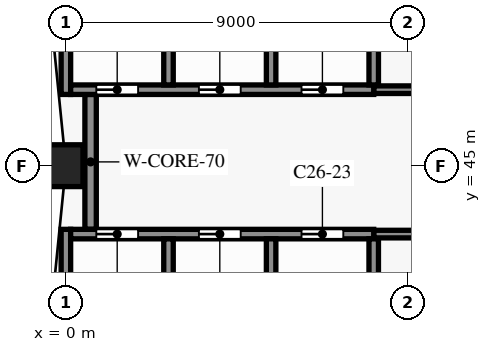
"""IFC4 building model, lengths in metres.
Left out: names, types, materials, properties, quantities, classifications, styles, units other than length and angle.
Written with IfcOpenShell. Run it as: python <this file> out.ifc"""

import sys

from ifc_helpers import new_model, si_unit, direction, frame, frame_2d, origin, origin_2d, place, context, subcontext, project, spatial, rectangle, extrude, element, fill, save


model = new_model("IFC4")
c1 = context("Model", 3, precision=1e-05, world=origin(), true_north=direction((0.0, 1.0)))
c2 = subcontext(c1, "Body", "Model", "MODEL_VIEW")
j1 = project(units=[si_unit("LENGTHUNIT", "METRE"), si_unit("PLANEANGLEUNIT", "RADIAN")], contexts=[c1])
p1 = place(None, origin())
s1 = spatial("IfcSite", under=j1, at=p1, CompositionType="ELEMENT")
p2 = place(p1, origin())
s2 = spatial("IfcBuilding", under=s1, at=p2, CompositionType="ELEMENT")
p3 = place(p2, frame((0.0, 0.0, 192.8)))
s3 = spatial("IfcBuildingStorey", under=s2, at=p3, CompositionType="ELEMENT", Elevation=192.8)
p4 = place(p3, frame((0.0, 45.0, 0.0), z_axis=(0.0, 0.0, 1.0), x_axis=(0.0, -1.0, 0.0)))
e1 = element("IfcColumn", 1, at=p4, inside=s3, PredefinedType="COLUMN", context=c2, shape_type="SweptSolid", body=[
    extrude(rectangle(XDim=0.9, YDim=1.1, at=origin_2d()), origin(), (0.0, 0.0, 1.0), 6.0),
])
p5 = place(p3, frame((8.1, 43.2, 0.0), z_axis=(0.0, 0.0, 1.0), x_axis=(1.0, 0.0, 0.0)))
e2 = element("IfcWall", 2, at=p5, inside=s3, PredefinedType="PARTITIONING", context=c2, shape_type="SweptSolid", body=[
    extrude(rectangle(XDim=16.1, YDim=0.2, at=frame_2d((8.05, 0.0))), origin(), (0.0, 0.0, 1.0), 5.7),
])
p6 = place(p5, frame((4.05, 0.0, 0.0)))
e3 = element("IfcOpeningElement", 3, at=p6, cuts=e2, PredefinedType="OPENING", context=c2, shape_type="SweptSolid", body=[
    extrude(rectangle(XDim=0.9, YDim=2.1, at=frame_2d((0.45, 1.05))), frame((0.0, 0.11, 0.0), z_axis=(0.0, -1.0, 0.0), x_axis=(1.0, 0.0, 0.0)), (0.0, 0.0, 1.0), 0.22),
])
p7 = place(p5, frame((12.15, 0.0, 0.0)))
e4 = element("IfcOpeningElement", 4, at=p7, cuts=e2, PredefinedType="OPENING", context=c2, shape_type="SweptSolid", body=[
    extrude(rectangle(XDim=0.9, YDim=2.1, at=frame_2d((0.45, 1.05))), frame((0.0, 0.11, 0.0), z_axis=(0.0, -1.0, 0.0), x_axis=(1.0, 0.0, 0.0)), (0.0, 0.0, 1.0), 0.22),
])
p8 = place(p3, frame((0.125, 43.2, 0.0), z_axis=(0.0, 0.0, 1.0), x_axis=(1.0, 0.0, 0.0)))
e5 = element("IfcWall", 5, at=p8, inside=s3, PredefinedType="SHEAR", context=c2, shape_type="SweptSolid", body=[
    extrude(rectangle(XDim=7.975, YDim=0.25, at=frame_2d((3.988, 0.0))), origin(), (0.0, 0.0, 1.0), 5.7),
])
p9 = place(p8, frame((0.675, 0.0, 0.0)))
e6 = element("IfcOpeningElement", 6, at=p9, cuts=e5, PredefinedType="OPENING", context=c2, shape_type="SweptSolid", body=[
    extrude(rectangle(XDim=1.1, YDim=2.1, at=frame_2d((0.55, 1.05))), frame((0.0, 0.135, 0.0), z_axis=(0.0, -1.0, 0.0), x_axis=(1.0, 0.0, 0.0)), (0.0, 0.0, 1.0), 0.27),
])
p10 = place(p8, frame((3.375, 0.0, 0.0)))
e7 = element("IfcOpeningElement", 7, at=p10, cuts=e5, PredefinedType="OPENING", context=c2, shape_type="SweptSolid", body=[
    extrude(rectangle(XDim=1.1, YDim=2.1, at=frame_2d((0.55, 1.05))), frame((0.0, 0.135, 0.0), z_axis=(0.0, -1.0, 0.0), x_axis=(1.0, 0.0, 0.0)), (0.0, 0.0, 1.0), 0.27),
])
p11 = place(p8, frame((6.075, 0.0, 0.0)))
e8 = element("IfcOpeningElement", 8, at=p11, cuts=e5, PredefinedType="OPENING", context=c2, shape_type="SweptSolid", body=[
    extrude(rectangle(XDim=1.1, YDim=2.1, at=frame_2d((0.55, 1.05))), frame((0.0, 0.135, 0.0), z_axis=(0.0, -1.0, 0.0), x_axis=(1.0, 0.0, 0.0)), (0.0, 0.0, 1.0), 0.27),
])
p12 = place(p3, frame((8.1, 47.0, 0.0), z_axis=(0.0, 0.0, 1.0), x_axis=(1.0, 0.0, 0.0)))
e9 = element("IfcWall", 9, at=p12, inside=s3, PredefinedType="PARTITIONING", context=c2, shape_type="SweptSolid", body=[
    extrude(rectangle(XDim=13.5, YDim=0.2, at=frame_2d((6.75, 0.0))), origin(), (0.0, 0.0, 1.0), 5.7),
])
p13 = place(p12, frame((3.3, 0.0, 0.0)))
e10 = element("IfcOpeningElement", 10, at=p13, cuts=e9, PredefinedType="OPENING", context=c2, shape_type="SweptSolid", body=[
    extrude(rectangle(XDim=0.9, YDim=2.1, at=frame_2d((0.45, 1.05))), frame((0.0, 0.11, 0.0), z_axis=(0.0, -1.0, 0.0), x_axis=(1.0, 0.0, 0.0)), (0.0, 0.0, 1.0), 0.22),
])
p14 = place(p12, frame((10.05, 0.0, 0.0)))
e11 = element("IfcOpeningElement", 11, at=p14, cuts=e9, PredefinedType="OPENING", context=c2, shape_type="SweptSolid", body=[
    extrude(rectangle(XDim=0.9, YDim=2.1, at=frame_2d((0.45, 1.05))), frame((0.0, 0.11, 0.0), z_axis=(0.0, -1.0, 0.0), x_axis=(1.0, 0.0, 0.0)), (0.0, 0.0, 1.0), 0.22),
])
p15 = place(p3, frame((0.125, 47.0, 0.0), z_axis=(0.0, 0.0, 1.0), x_axis=(1.0, 0.0, 0.0)))
e12 = element("IfcWall", 12, at=p15, inside=s3, PredefinedType="SHEAR", context=c2, shape_type="SweptSolid", body=[
    extrude(rectangle(XDim=7.975, YDim=0.25, at=frame_2d((3.988, 0.0))), origin(), (0.0, 0.0, 1.0), 5.7),
])
p16 = place(p15, frame((0.675, 0.0, 0.0)))
e13 = element("IfcOpeningElement", 13, at=p16, cuts=e12, PredefinedType="OPENING", context=c2, shape_type="SweptSolid", body=[
    extrude(rectangle(XDim=1.1, YDim=2.1, at=frame_2d((0.55, 1.05))), frame((0.0, 0.135, 0.0), z_axis=(0.0, -1.0, 0.0), x_axis=(1.0, 0.0, 0.0)), (0.0, 0.0, 1.0), 0.27),
])
p17 = place(p15, frame((3.375, 0.0, 0.0)))
e14 = element("IfcOpeningElement", 14, at=p17, cuts=e12, PredefinedType="OPENING", context=c2, shape_type="SweptSolid", body=[
    extrude(rectangle(XDim=1.1, YDim=2.1, at=frame_2d((0.55, 1.05))), frame((0.0, 0.135, 0.0), z_axis=(0.0, -1.0, 0.0), x_axis=(1.0, 0.0, 0.0)), (0.0, 0.0, 1.0), 0.27),
])
p18 = place(p15, frame((6.075, 0.0, 0.0)))
e15 = element("IfcOpeningElement", 15, at=p18, cuts=e12, PredefinedType="OPENING", context=c2, shape_type="SweptSolid", body=[
    extrude(rectangle(XDim=1.1, YDim=2.1, at=frame_2d((0.55, 1.05))), frame((0.0, 0.135, 0.0), z_axis=(0.0, -1.0, 0.0), x_axis=(1.0, 0.0, 0.0)), (0.0, 0.0, 1.0), 0.27),
])
p19 = place(p3, frame((0.0, 39.875, 0.0), z_axis=(0.0, 0.0, 1.0), x_axis=(0.0, 1.0, 0.0)))
e16 = element("IfcWall", 16, at=p19, inside=s3, PredefinedType="SHEAR", context=c2, shape_type="SweptSolid", body=[
    extrude(rectangle(XDim=3.45, YDim=0.25, at=frame_2d((1.725, 0.0))), origin(), (0.0, 0.0, 1.0), 5.7),
])
p20 = place(p3, frame((0.0, 46.875, 0.0), z_axis=(0.0, 0.0, 1.0), x_axis=(0.0, 1.0, 0.0)))
e17 = element("IfcWall", 17, at=p20, inside=s3, PredefinedType="SHEAR", context=c2, shape_type="SweptSolid", body=[
    extrude(rectangle(XDim=3.475, YDim=0.25, at=frame_2d((1.738, 0.0))), origin(), (0.0, 0.0, 1.0), 5.7),
])
p21 = place(p3, frame((0.65, 43.325, 0.0), z_axis=(0.0, 0.0, 1.0), x_axis=(0.0, 1.0, 0.0)))
e18 = element("IfcWall", 18, at=p21, inside=s3, PredefinedType="SHEAR", context=c2, shape_type="SweptSolid", body=[
    extrude(rectangle(XDim=3.55, YDim=0.3, at=frame_2d((1.775, 0.0))), origin(), (0.0, 0.0, 1.0), 5.7),
])
for number, where, z_axis, x_axis in (
    (19, (2.7, 40.125, 0.0), (0.0, 0.0, 1.0), (0.0, 1.0, 0.0)),
    (20, (2.7, 47.125, 0.0), (0.0, 0.0, 1.0), (0.0, 1.0, 0.0)),
    (21, (5.4, 40.125, 0.0), (0.0, 0.0, 1.0), (0.0, 1.0, 0.0)),
    (22, (5.4, 47.125, 0.0), (0.0, 0.0, 1.0), (0.0, 1.0, 0.0)),
    (23, (8.1, 40.125, 0.0), (0.0, 0.0, 1.0), (0.0, 1.0, 0.0)),
):
    element("IfcWall", number, at=place(p3, frame(where, z_axis=z_axis, x_axis=x_axis)), inside=s3, PredefinedType="SHEAR", context=c2, shape_type="SweptSolid", body=[
        extrude(rectangle(XDim=2.95, YDim=0.25, at=frame_2d((1.475, 0.0))), origin(), (0.0, 0.0, 1.0), 5.7),
    ])
p22 = place(p3, frame((8.1, 47.125, 0.0), z_axis=(0.0, 0.0, 1.0), x_axis=(0.0, 1.0, 0.0)))
e24 = element("IfcWall", 24, at=p22, inside=s3, PredefinedType="SHEAR", context=c2, shape_type="SweptSolid", body=[
    extrude(rectangle(XDim=3.075, YDim=0.25, at=frame_2d((1.538, 0.0))), origin(), (0.0, 0.0, 1.0), 5.7),
])
p23 = place(p9, origin())
e25 = element("IfcDoor", 25, at=p23, inside=s3, OperationType="DOUBLE_DOOR_SLIDING", PredefinedType="DOOR", context=c2, shape_type="SweptSolid", body=[
    extrude(rectangle(XDim=1.1, YDim=2.1, at=frame_2d((0.55, 1.05))), frame((0.0, 0.025, 0.0), z_axis=(0.0, -1.0, 0.0), x_axis=(1.0, 0.0, 0.0)), (0.0, 0.0, 1.0), 0.05),
])
fill(e6, e25)
p24 = place(p10, origin())
e26 = element("IfcDoor", 26, at=p24, inside=s3, OperationType="DOUBLE_DOOR_SLIDING", PredefinedType="DOOR", context=c2, shape_type="SweptSolid", body=[
    extrude(rectangle(XDim=1.1, YDim=2.1, at=frame_2d((0.55, 1.05))), frame((0.0, 0.025, 0.0), z_axis=(0.0, -1.0, 0.0), x_axis=(1.0, 0.0, 0.0)), (0.0, 0.0, 1.0), 0.05),
])
fill(e7, e26)
p25 = place(p11, origin())
e27 = element("IfcDoor", 27, at=p25, inside=s3, OperationType="DOUBLE_DOOR_SLIDING", PredefinedType="DOOR", context=c2, shape_type="SweptSolid", body=[
    extrude(rectangle(XDim=1.1, YDim=2.1, at=frame_2d((0.55, 1.05))), frame((0.0, 0.025, 0.0), z_axis=(0.0, -1.0, 0.0), x_axis=(1.0, 0.0, 0.0)), (0.0, 0.0, 1.0), 0.05),
])
fill(e8, e27)
p26 = place(p16, origin())
e28 = element("IfcDoor", 28, at=p26, inside=s3, OperationType="DOUBLE_DOOR_SLIDING", PredefinedType="DOOR", context=c2, shape_type="SweptSolid", body=[
    extrude(rectangle(XDim=1.1, YDim=2.1, at=frame_2d((0.55, 1.05))), frame((0.0, 0.025, 0.0), z_axis=(0.0, -1.0, 0.0), x_axis=(1.0, 0.0, 0.0)), (0.0, 0.0, 1.0), 0.05),
])
fill(e13, e28)
p27 = place(p17, origin())
e29 = element("IfcDoor", 29, at=p27, inside=s3, OperationType="DOUBLE_DOOR_SLIDING", PredefinedType="DOOR", context=c2, shape_type="SweptSolid", body=[
    extrude(rectangle(XDim=1.1, YDim=2.1, at=frame_2d((0.55, 1.05))), frame((0.0, 0.025, 0.0), z_axis=(0.0, -1.0, 0.0), x_axis=(1.0, 0.0, 0.0)), (0.0, 0.0, 1.0), 0.05),
])
fill(e14, e29)
p28 = place(p18, origin())
e30 = element("IfcDoor", 30, at=p28, inside=s3, OperationType="DOUBLE_DOOR_SLIDING", PredefinedType="DOOR", context=c2, shape_type="SweptSolid", body=[
    extrude(rectangle(XDim=1.1, YDim=2.1, at=frame_2d((0.55, 1.05))), frame((0.0, 0.025, 0.0), z_axis=(0.0, -1.0, 0.0), x_axis=(1.0, 0.0, 0.0)), (0.0, 0.0, 1.0), 0.05),
])
fill(e15, e30)
save(model, sys.argv[1])
